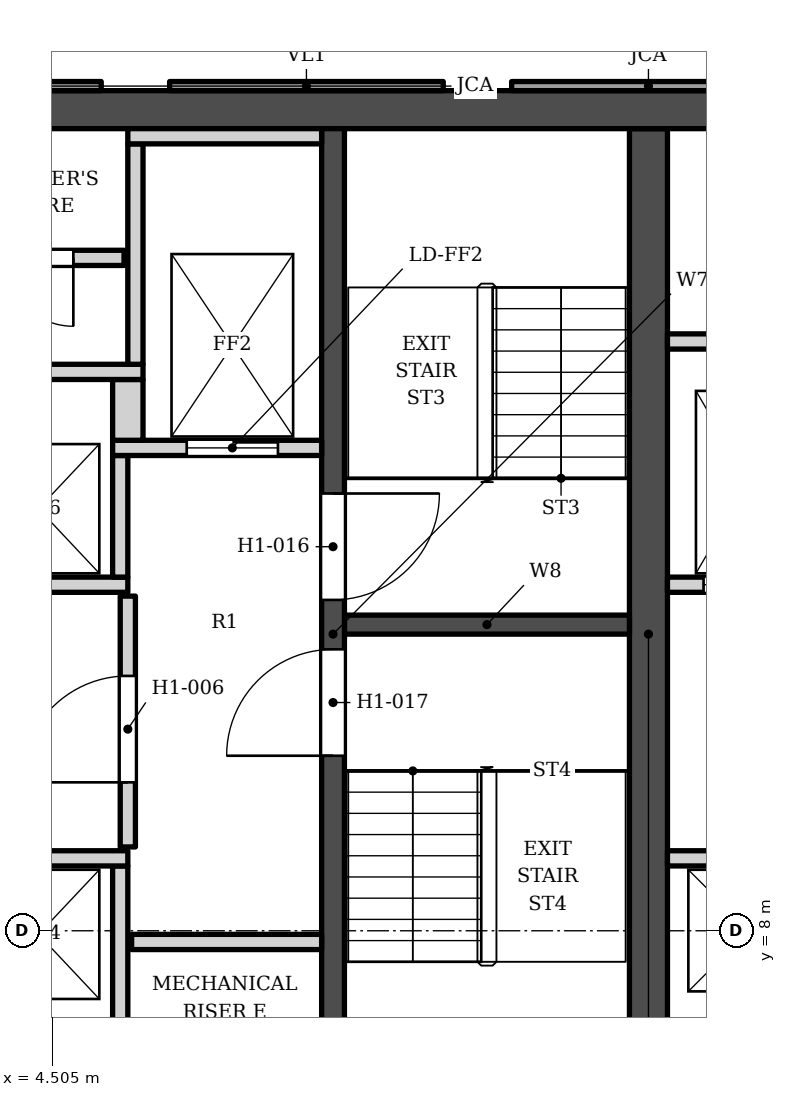
"""IFC4 building model, lengths in metres.
Left out: names, types, materials, properties, quantities, classifications, styles, units other than length and angle.
Written with IfcOpenShell. Run it as: python <this file> out.ifc"""

import sys

from ifc_helpers import new_model, si_unit, direction, frame, frame_2d, origin, place, context, subcontext, project, spatial, polyline, rectangle, outline, extrude, element, fill, save


model = new_model("IFC4")
c1 = context("Model", 3, precision=1e-05, world=origin(), true_north=direction((0.0, 1.0)))
c2 = subcontext(c1, "Body", "Model", "MODEL_VIEW")
j1 = project(units=[si_unit("LENGTHUNIT", "METRE"), si_unit("PLANEANGLEUNIT", "RADIAN")], contexts=[c1])
p1 = place(None, origin())
s1 = spatial("IfcSite", under=j1, at=p1, CompositionType="ELEMENT")
p2 = place(p1, origin())
s2 = spatial("IfcBuilding", under=s1, at=p2, CompositionType="ELEMENT")
p3 = place(p2, frame((0.0, 0.0, 46.0)))
s3 = spatial("IfcBuildingStorey", under=s2, at=p3, CompositionType="ELEMENT", Elevation=46.0)
p4 = place(p3, frame((-16.9, 18.802, 0.0), z_axis=(0.0, 0.0, 1.0), x_axis=(1.0, 0.0, 0.0)))
e1 = element("IfcWall", 1, at=p4, inside=s3, PredefinedType="SHEAR", context=c2, shape_type="SweptSolid", body=[
    extrude(rectangle(XDim=33.8, YDim=0.5, at=frame_2d((16.9, 0.0))), origin(), (0.0, 0.0, 1.0), 3.4),
])
p5 = place(p3, frame((12.35, 5.253, 0.0), z_axis=(0.0, 0.0, 1.0), x_axis=(0.0, 1.0, 0.0)))
e2 = element("IfcWall", 2, at=p5, inside=s3, PredefinedType="SHEAR", context=c2, shape_type="SweptSolid", body=[
    extrude(rectangle(XDim=13.3, YDim=0.5, at=frame_2d((6.65, 0.0))), origin(), (0.0, 0.0, 1.0), 3.4),
])
p6 = place(p3, frame((8.2, 5.253, 0.0), z_axis=(0.0, 0.0, 1.0), x_axis=(0.0, 1.0, 0.0)))
e3 = element("IfcWall", 3, at=p6, inside=s3, PredefinedType="SHEAR", context=c2, shape_type="SweptSolid", body=[
    extrude(rectangle(XDim=13.3, YDim=0.3, at=frame_2d((6.65, 0.0))), origin(), (0.0, 0.0, 1.0), 3.4),
])
p7 = place(p6, frame((7.1, 0.0, 0.0)))
e4 = element("IfcOpeningElement", 4, at=p7, cuts=e3, PredefinedType="OPENING", context=c2, shape_type="SweptSolid", body=[
    extrude(rectangle(XDim=1.4, YDim=2.1, at=frame_2d((0.7, 1.05))), frame((0.0, 0.16, 0.0), z_axis=(0.0, -1.0, 0.0), x_axis=(1.0, 0.0, 0.0)), (0.0, 0.0, 1.0), 0.32),
])
p8 = place(p6, frame((5.05, 0.0, 0.0)))
e5 = element("IfcOpeningElement", 5, at=p8, cuts=e3, PredefinedType="OPENING", context=c2, shape_type="SweptSolid", body=[
    extrude(rectangle(XDim=1.4, YDim=2.1, at=frame_2d((0.7, 1.05))), frame((0.0, 0.16, 0.0), z_axis=(0.0, -1.0, 0.0), x_axis=(1.0, 0.0, 0.0)), (0.0, 0.0, 1.0), 0.32),
])
p9 = place(p3, frame((8.35, 12.028, 0.0), z_axis=(0.0, 0.0, 1.0), x_axis=(1.0, 0.0, 0.0)))
e6 = element("IfcWall", 6, at=p9, inside=s3, PredefinedType="SHEAR", context=c2, shape_type="SweptSolid", body=[
    extrude(rectangle(XDim=3.75, YDim=0.25, at=frame_2d((1.875, 0.0))), origin(), (0.0, 0.0, 1.0), 3.4),
])
p10 = place(p3, origin())
e7 = element("IfcWall", 7, at=p10, inside=s3, PredefinedType="SOLIDWALL", context=c2, shape_type="SweptSolid", body=[
    extrude(outline(polyline([(10.55, 19.173), (10.55, 19.052), (14.15, 19.052), (14.15, 19.173), (10.55, 19.173)])), origin(), (0.0, 0.0, 1.0), 2.65),
])
p11 = place(p3, origin())
e8 = element("IfcWall", 8, at=p11, inside=s3, PredefinedType="ELEMENTEDWALL", context=c2, shape_type="SweptSolid", body=[
    extrude(outline(polyline([(6.05, 19.173), (6.05, 19.052), (9.65, 19.052), (9.65, 19.173), (6.05, 19.173)])), origin(), (0.0, 0.0, 1.0), 2.65),
])
p12 = place(p3, origin())
e9 = element("IfcWall", 9, at=p12, inside=s3, PredefinedType="SOLIDWALL", context=c2, shape_type="SweptSolid", body=[
    extrude(outline(polyline([(1.55, 19.173), (1.55, 19.052), (5.15, 19.052), (5.15, 19.173), (1.55, 19.173)])), origin(), (0.0, 0.0, 1.0), 2.65),
])
for number, where, z_axis, x_axis in (
    (10, (5.4, 6.353, 0.0), (0.0, 0.0, 1.0), (0.0, 1.0, 0.0)),
    (11, (5.55, 7.853, 0.0), (0.0, 0.0, 1.0), (1.0, 0.0, 0.0)),
):
    element("IfcWall", number, at=place(p3, frame(where, z_axis=z_axis, x_axis=x_axis)), inside=s3, PredefinedType="SOLIDWALL", context=c2, shape_type="SweptSolid", body=[
        extrude(rectangle(XDim=2.5, YDim=0.2, at=frame_2d((1.25, 0.0))), origin(), (0.0, 0.0, 1.0), 3.23),
    ])
p13 = place(p3, frame((1.0, 8.953, 0.0), z_axis=(0.0, 0.0, 1.0), x_axis=(1.0, 0.0, 0.0)))
e12 = element("IfcWall", 12, at=p13, inside=s3, PredefinedType="SOLIDWALL", context=c2, shape_type="SweptSolid", body=[
    extrude(rectangle(XDim=4.5, YDim=0.2, at=frame_2d((2.25, 0.0))), origin(), (0.0, 0.0, 1.0), 3.23),
])
p14 = place(p3, frame((12.6, 8.953, 0.0), z_axis=(0.0, 0.0, 1.0), x_axis=(1.0, 0.0, 0.0)))
e13 = element("IfcWall", 13, at=p14, inside=s3, PredefinedType="SOLIDWALL", context=c2, shape_type="SweptSolid", body=[
    extrude(rectangle(XDim=4.3, YDim=0.2, at=frame_2d((2.15, 0.0))), origin(), (0.0, 0.0, 1.0), 3.23),
])
p15 = place(p14, frame((0.525, 0.0, 0.0)))
e14 = element("IfcOpeningElement", 14, at=p15, cuts=e13, PredefinedType="OPENING", context=c2, shape_type="SweptSolid", body=[
    extrude(rectangle(XDim=1.1, YDim=2.1, at=frame_2d((0.55, 1.05))), frame((0.0, 0.11, 0.0), z_axis=(0.0, -1.0, 0.0), x_axis=(1.0, 0.0, 0.0)), (0.0, 0.0, 1.0), 0.22),
])
p16 = place(p14, frame((2.775, 0.0, 0.0)))
e15 = element("IfcOpeningElement", 15, at=p16, cuts=e13, PredefinedType="OPENING", context=c2, shape_type="SweptSolid", body=[
    extrude(rectangle(XDim=1.1, YDim=2.1, at=frame_2d((0.55, 1.05))), frame((0.0, 0.11, 0.0), z_axis=(0.0, -1.0, 0.0), x_axis=(1.0, 0.0, 0.0)), (0.0, 0.0, 1.0), 0.22),
])
p17 = place(p3, frame((5.5, 9.103, 0.0), z_axis=(0.0, 0.0, 1.0), x_axis=(0.0, 1.0, 0.0)))
e16 = element("IfcWall", 16, at=p17, inside=s3, PredefinedType="SOLIDWALL", context=c2, shape_type="SweptSolid", body=[
    extrude(rectangle(XDim=3.3, YDim=0.2, at=frame_2d((1.65, 0.0))), origin(), (0.0, 0.0, 1.0), 3.23),
])
p18 = place(p17, frame((0.85, 0.0, 0.0)))
e17 = element("IfcOpeningElement", 17, at=p18, cuts=e16, PredefinedType="OPENING", context=c2, shape_type="SweptSolid", body=[
    extrude(rectangle(XDim=1.4, YDim=2.1, at=frame_2d((0.7, 1.05))), frame((0.0, 0.11, 0.0), z_axis=(0.0, -1.0, 0.0), x_axis=(1.0, 0.0, 0.0)), (0.0, 0.0, 1.0), 0.22),
])
p19 = place(p3, frame((-1.5, 12.552, 0.0), z_axis=(0.0, 0.0, 1.0), x_axis=(1.0, 0.0, 0.0)))
e18 = element("IfcWall", 18, at=p19, inside=s3, PredefinedType="SOLIDWALL", context=c2, shape_type="SweptSolid", body=[
    extrude(rectangle(XDim=7.0, YDim=0.2, at=frame_2d((3.5, 0.0))), origin(), (0.0, 0.0, 1.0), 3.23),
])
p20 = place(p3, frame((12.6, 12.552, 0.0), z_axis=(0.0, 0.0, 1.0), x_axis=(1.0, 0.0, 0.0)))
e19 = element("IfcWall", 19, at=p20, inside=s3, PredefinedType="SOLIDWALL", context=c2, shape_type="SweptSolid", body=[
    extrude(rectangle(XDim=4.3, YDim=0.2, at=frame_2d((2.15, 0.0))), origin(), (0.0, 0.0, 1.0), 3.23),
])
p21 = place(p20, frame((0.475, 0.0, 0.0)))
e20 = element("IfcOpeningElement", 20, at=p21, cuts=e19, PredefinedType="OPENING", context=c2, shape_type="SweptSolid", body=[
    extrude(rectangle(XDim=1.2, YDim=2.1, at=frame_2d((0.6, 1.05))), frame((0.0, 0.11, 0.0), z_axis=(0.0, -1.0, 0.0), x_axis=(1.0, 0.0, 0.0)), (0.0, 0.0, 1.0), 0.22),
])
p22 = place(p20, frame((2.625, 0.0, 0.0)))
e21 = element("IfcOpeningElement", 21, at=p22, cuts=e19, PredefinedType="OPENING", context=c2, shape_type="SweptSolid", body=[
    extrude(rectangle(XDim=1.4, YDim=2.1, at=frame_2d((0.7, 1.05))), frame((0.0, 0.11, 0.0), z_axis=(0.0, -1.0, 0.0), x_axis=(1.0, 0.0, 0.0)), (0.0, 0.0, 1.0), 0.22),
])
p23 = place(p3, frame((5.4, 12.653, 0.0), z_axis=(0.0, 0.0, 1.0), x_axis=(0.0, 1.0, 0.0)))
e22 = element("IfcWall", 22, at=p23, inside=s3, PredefinedType="SOLIDWALL", context=c2, shape_type="SweptSolid", body=[
    extrude(rectangle(XDim=1.6, YDim=0.2, at=frame_2d((0.8, 0.0))), origin(), (0.0, 0.0, 1.0), 3.23),
])
p24 = place(p3, frame((5.3, 14.353, 0.0), z_axis=(0.0, 0.0, 1.0), x_axis=(1.0, 0.0, 0.0)))
e23 = element("IfcWall", 23, at=p24, inside=s3, PredefinedType="SOLIDWALL", context=c2, shape_type="SweptSolid", body=[
    extrude(rectangle(XDim=2.75, YDim=0.2, at=frame_2d((1.375, 0.0))), origin(), (0.0, 0.0, 1.0), 3.23),
])
p25 = place(p24, frame((0.975, 0.0, 0.0)))
e24 = element("IfcOpeningElement", 24, at=p25, cuts=e23, PredefinedType="OPENING", context=c2, shape_type="SweptSolid", body=[
    extrude(rectangle(XDim=1.2, YDim=2.1, at=frame_2d((0.6, 1.05))), frame((0.0, 0.11, 0.0), z_axis=(0.0, -1.0, 0.0), x_axis=(1.0, 0.0, 0.0)), (0.0, 0.0, 1.0), 0.22),
])
p26 = place(p3, frame((5.5, 14.453, 0.0), z_axis=(0.0, 0.0, 1.0), x_axis=(0.0, 1.0, 0.0)))
e25 = element("IfcWall", 25, at=p26, inside=s3, PredefinedType="SOLIDWALL", context=c2, shape_type="SweptSolid", body=[
    extrude(rectangle(XDim=0.8, YDim=0.4, at=frame_2d((0.4, 0.0))), origin(), (0.0, 0.0, 1.0), 3.23),
])
p27 = place(p3, frame((-1.5, 15.353, 0.0), z_axis=(0.0, 0.0, 1.0), x_axis=(1.0, 0.0, 0.0)))
e26 = element("IfcWall", 26, at=p27, inside=s3, PredefinedType="SOLIDWALL", context=c2, shape_type="SweptSolid", body=[
    extrude(rectangle(XDim=7.2, YDim=0.2, at=frame_2d((3.6, 0.0))), origin(), (0.0, 0.0, 1.0), 3.23),
])
p28 = place(p3, frame((5.6, 15.453, 0.0), z_axis=(0.0, 0.0, 1.0), x_axis=(0.0, 1.0, 0.0)))
e27 = element("IfcWall", 27, at=p28, inside=s3, PredefinedType="SOLIDWALL", context=c2, shape_type="SweptSolid", body=[
    extrude(rectangle(XDim=2.9, YDim=0.2, at=frame_2d((1.45, 0.0))), origin(), (0.0, 0.0, 1.0), 3.23),
])
p29 = place(p3, frame((12.6, 15.753, 0.0), z_axis=(0.0, 0.0, 1.0), x_axis=(1.0, 0.0, 0.0)))
e28 = element("IfcWall", 28, at=p29, inside=s3, PredefinedType="SOLIDWALL", context=c2, shape_type="SweptSolid", body=[
    extrude(rectangle(XDim=4.3, YDim=0.2, at=frame_2d((2.15, 0.0))), origin(), (0.0, 0.0, 1.0), 3.23),
])
p30 = place(p3, frame((-1.6, 16.853, 0.0), z_axis=(0.0, 0.0, 1.0), x_axis=(1.0, 0.0, 0.0)))
e29 = element("IfcWall", 29, at=p30, inside=s3, PredefinedType="SOLIDWALL", context=c2, shape_type="SweptSolid", body=[
    extrude(rectangle(XDim=7.05, YDim=0.2, at=frame_2d((3.525, 0.0))), origin(), (0.0, 0.0, 1.0), 3.23),
])
p31 = place(p30, frame((0.817, 0.0, 0.0)))
e30 = element("IfcOpeningElement", 30, at=p31, cuts=e29, PredefinedType="OPENING", context=c2, shape_type="SweptSolid", body=[
    extrude(rectangle(XDim=0.9, YDim=2.1, at=frame_2d((0.45, 1.05))), frame((0.0, 0.11, 0.0), z_axis=(0.0, -1.0, 0.0), x_axis=(1.0, 0.0, 0.0)), (0.0, 0.0, 1.0), 0.22),
])
p32 = place(p30, frame((3.15, 0.0, 0.0)))
e31 = element("IfcOpeningElement", 31, at=p32, cuts=e29, PredefinedType="OPENING", context=c2, shape_type="SweptSolid", body=[
    extrude(rectangle(XDim=0.9, YDim=2.1, at=frame_2d((0.45, 1.05))), frame((0.0, 0.11, 0.0), z_axis=(0.0, -1.0, 0.0), x_axis=(1.0, 0.0, 0.0)), (0.0, 0.0, 1.0), 0.22),
])
p33 = place(p30, frame((5.483, 0.0, 0.0)))
e32 = element("IfcOpeningElement", 32, at=p33, cuts=e29, PredefinedType="OPENING", context=c2, shape_type="SweptSolid", body=[
    extrude(rectangle(XDim=0.9, YDim=2.1, at=frame_2d((0.45, 1.05))), frame((0.0, 0.11, 0.0), z_axis=(0.0, -1.0, 0.0), x_axis=(1.0, 0.0, 0.0)), (0.0, 0.0, 1.0), 0.22),
])
p34 = place(p3, frame((5.5, 18.453, 0.0), z_axis=(0.0, 0.0, 1.0), x_axis=(1.0, 0.0, 0.0)))
e33 = element("IfcWall", 33, at=p34, inside=s3, PredefinedType="SOLIDWALL", context=c2, shape_type="SweptSolid", body=[
    extrude(rectangle(XDim=2.55, YDim=0.2, at=frame_2d((1.275, 0.0))), origin(), (0.0, 0.0, 1.0), 3.23),
])
p35 = place(p25, origin())
e34 = element("IfcDoor", 34, at=p35, inside=s3, OperationType="DOUBLE_DOOR_SLIDING", PredefinedType="DOOR", context=c2, shape_type="SweptSolid", body=[
    extrude(rectangle(XDim=1.2, YDim=2.1, at=frame_2d((0.6, 1.05))), frame((0.0, 0.025, 0.0), z_axis=(0.0, -1.0, 0.0), x_axis=(1.0, 0.0, 0.0)), (0.0, 0.0, 1.0), 0.05),
])
fill(e24, e34)
p36 = place(p21, origin())
e35 = element("IfcDoor", 35, at=p36, inside=s3, OperationType="DOUBLE_DOOR_SLIDING", PredefinedType="DOOR", context=c2, shape_type="SweptSolid", body=[
    extrude(rectangle(XDim=1.2, YDim=2.1, at=frame_2d((0.6, 1.05))), frame((0.0, 0.025, 0.0), z_axis=(0.0, -1.0, 0.0), x_axis=(1.0, 0.0, 0.0)), (0.0, 0.0, 1.0), 0.05),
])
fill(e20, e35)
p37 = place(p7, origin())
e36 = element("IfcDoor", 36, at=p37, inside=s3, OperationType="SINGLE_SWING_RIGHT", PredefinedType="DOOR", context=c2, shape_type="SweptSolid", body=[
    extrude(rectangle(XDim=1.4, YDim=2.1, at=frame_2d((0.7, 1.05))), frame((0.0, 0.025, 0.0), z_axis=(0.0, -1.0, 0.0), x_axis=(1.0, 0.0, 0.0)), (0.0, 0.0, 1.0), 0.05),
])
fill(e4, e36)
p38 = place(p8, origin())
e37 = element("IfcDoor", 37, at=p38, inside=s3, OperationType="SINGLE_SWING_LEFT", PredefinedType="DOOR", context=c2, shape_type="SweptSolid", body=[
    extrude(rectangle(XDim=1.4, YDim=2.1, at=frame_2d((0.7, 1.05))), frame((0.0, 0.025, 0.0), z_axis=(0.0, -1.0, 0.0), x_axis=(1.0, 0.0, 0.0)), (0.0, 0.0, 1.0), 0.05),
])
fill(e5, e37)
p39 = place(p18, origin())
e38 = element("IfcDoor", 38, at=p39, inside=s3, OperationType="SINGLE_SWING_LEFT", PredefinedType="DOOR", context=c2, shape_type="SweptSolid", body=[
    extrude(rectangle(XDim=1.4, YDim=2.1, at=frame_2d((0.7, 1.05))), frame((0.0, 0.025, 0.0), z_axis=(0.0, -1.0, 0.0), x_axis=(1.0, 0.0, 0.0)), (0.0, 0.0, 1.0), 0.05),
])
fill(e17, e38)
p40 = place(p33, origin())
e39 = element("IfcDoor", 39, at=p40, inside=s3, OperationType="SINGLE_SWING_RIGHT", PredefinedType="DOOR", context=c2, shape_type="SweptSolid", body=[
    extrude(rectangle(XDim=0.9, YDim=2.1, at=frame_2d((0.45, 1.05))), frame((0.0, 0.025, 0.0), z_axis=(0.0, -1.0, 0.0), x_axis=(1.0, 0.0, 0.0)), (0.0, 0.0, 1.0), 0.05),
])
fill(e32, e39)
save(model, sys.argv[1])
